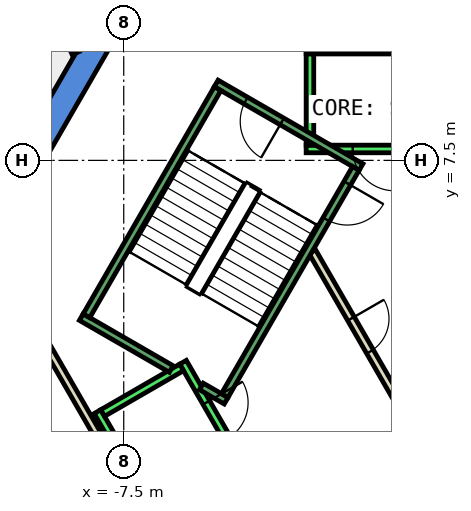
"""IFC4 building model, lengths in metres.
Left out: names, types, materials, properties, quantities, classifications, styles, units other than length and angle.
Written with IfcOpenShell. Run it as: python <this file> out.ifc"""

import sys

from ifc_helpers import new_model, si_unit, direction, frame, frame_2d, origin, place, context, subcontext, project, spatial, polyline, rectangle, outline, extrude, element, fill, save


model = new_model("IFC4")
c1 = context("Model", 3, precision=1e-05, world=origin(), true_north=direction((0.0, 1.0)))
c2 = subcontext(c1, "Body", "Model", "MODEL_VIEW")
j1 = project(units=[si_unit("LENGTHUNIT", "METRE"), si_unit("PLANEANGLEUNIT", "RADIAN")], contexts=[c1])
p1 = place(None, origin())
s1 = spatial("IfcSite", under=j1, at=p1, CompositionType="ELEMENT")
p2 = place(p1, origin())
s2 = spatial("IfcBuilding", under=s1, at=p2, CompositionType="ELEMENT")
p3 = place(p2, frame((0.0, 0.0, 219.2)))
s3 = spatial("IfcBuildingStorey", under=s2, at=p3, CompositionType="ELEMENT", Elevation=219.2)
p4 = place(p3, frame((0.0, 0.0, -0.4)))
e1 = element("IfcWall", 1, at=p4, inside=s3, PredefinedType="SHEAR", context=c2, shape_type="SweptSolid", body=[
    extrude(outline(polyline([(-11.834, 5.002), (-11.228, 4.652), (-6.235, 13.3), (-6.64, 14.0), (-11.834, 5.002)])), origin(), (0.0, 0.0, 1.0), 4.2),
])
p5 = place(p3, frame((0.0, 0.0, -0.4)))
e2 = element("IfcWall", 2, at=p5, inside=s3, PredefinedType="SHEAR", context=c2, shape_type="SweptSolid", body=[
    extrude(outline(polyline([(-13.279, 2.5), (-6.64, -9.0), (-6.235, -8.3), (-12.471, 2.5), (-13.279, 2.5)])), origin(), (0.0, 0.0, 1.0), 4.2),
])
p6 = place(p3, frame((-9.624, 12.265, 0.0), z_axis=(0.0, 0.0, 1.0), x_axis=(0.404081180606, -0.914723127225, 0.0)))
e3 = element("IfcWall", 3, at=p6, inside=s3, PredefinedType="PARTITIONING", context=c2, shape_type="SweptSolid", body=[
    extrude(rectangle(XDim=2.126, YDim=0.2, at=frame_2d((1.063, 0.0))), origin(), (0.0, 0.0, 1.0), 3.8),
])
p7 = place(p3, frame((-9.751, 2.99, 0.0), z_axis=(0.0, 0.0, 1.0), x_axis=(0.499955951776, -0.866050833545, 0.0)))
e4 = element("IfcWall", 4, at=p7, inside=s3, PredefinedType="PARTITIONING", context=c2, shape_type="SweptSolid", body=[
    extrude(rectangle(XDim=5.4, YDim=0.2, at=frame_2d((2.7, 0.0))), origin(), (0.0, 0.0, 1.0), 3.8),
])
p8 = place(p3, frame((-0.982, -1.0, 0.0), z_axis=(0.0, 0.0, 1.0), x_axis=(0.50024047865, 0.865886518847, 0.0)))
e5 = element("IfcWall", 5, at=p8, inside=s3, PredefinedType="PARTITIONING", context=c2, shape_type="SweptSolid", body=[
    extrude(rectangle(XDim=1.863, YDim=0.2, at=frame_2d((0.931, 0.0))), origin(), (0.0, 0.0, 1.0), 3.8),
])
p9 = place(p3, frame((-2.54, 5.1, 0.0), z_axis=(0.0, 0.0, 1.0), x_axis=(0.499925051871, -0.866068670783, 0.0)))
e6 = element("IfcWall", 6, at=p9, inside=s3, PredefinedType="PARTITIONING", context=c2, shape_type="SweptSolid", body=[
    extrude(rectangle(XDim=5.181, YDim=0.2, at=frame_2d((2.59, 0.0))), origin(), (0.0, 0.0, 1.0), 3.8),
])
p10 = place(p9, frame((2.04, 0.0, 0.0)))
e7 = element("IfcOpeningElement", 7, at=p10, cuts=e6, PredefinedType="OPENING", context=c2, shape_type="SweptSolid", body=[
    extrude(rectangle(XDim=1.0, YDim=2.1, at=frame_2d((0.5, 1.05))), frame((0.0, 0.11, 0.0), z_axis=(0.0, -1.0, 0.0), x_axis=(1.0, 0.0, 0.0)), (0.0, 0.0, 1.0), 0.22),
])
p11 = place(p3, frame((2.7, 7.8, 0.0), z_axis=(0.0, 0.0, 1.0), x_axis=(-1.0, 0.0, 0.0)))
e8 = element("IfcWall", 8, at=p11, inside=s3, PredefinedType="STANDARD", context=c2, shape_type="SweptSolid", body=[
    extrude(rectangle(XDim=5.4, YDim=0.2, at=frame_2d((2.7, 0.0))), origin(), (0.0, 0.0, 1.0), 3.8),
])
p12 = place(p11, frame((1.225, 0.0, 0.0)))
e9 = element("IfcOpeningElement", 9, at=p12, cuts=e8, PredefinedType="OPENING", context=c2, shape_type="SweptSolid", body=[
    extrude(rectangle(XDim=1.1, YDim=2.1, at=frame_2d((0.55, 1.05))), frame((0.0, 0.11, 0.0), z_axis=(0.0, -1.0, 0.0), x_axis=(1.0, 0.0, 0.0)), (0.0, 0.0, 1.0), 0.22),
])
p13 = place(p11, frame((3.075, 0.0, 0.0)))
e10 = element("IfcOpeningElement", 10, at=p13, cuts=e8, PredefinedType="OPENING", context=c2, shape_type="SweptSolid", body=[
    extrude(rectangle(XDim=1.1, YDim=2.1, at=frame_2d((0.55, 1.05))), frame((0.0, 0.11, 0.0), z_axis=(0.0, -1.0, 0.0), x_axis=(1.0, 0.0, 0.0)), (0.0, 0.0, 1.0), 0.22),
])
p14 = place(p3, frame((2.7, 10.4, 0.0), z_axis=(0.0, 0.0, 1.0), x_axis=(-1.0, 0.0, 0.0)))
e11 = element("IfcWall", 11, at=p14, inside=s3, PredefinedType="STANDARD", context=c2, shape_type="SweptSolid", body=[
    extrude(rectangle(XDim=5.4, YDim=0.2, at=frame_2d((2.7, 0.0))), origin(), (0.0, 0.0, 1.0), 3.8),
])
p15 = place(p3, frame((-2.6, 7.9, 0.0), z_axis=(0.0, 0.0, 1.0), x_axis=(0.0, 1.0, 0.0)))
e12 = element("IfcWall", 12, at=p15, inside=s3, PredefinedType="STANDARD", context=c2, shape_type="SweptSolid", body=[
    extrude(rectangle(XDim=2.4, YDim=0.2, at=frame_2d((1.2, 0.0))), origin(), (0.0, 0.0, 1.0), 3.8),
])
p16 = place(p3, frame((-5.94, 2.188, 0.0), z_axis=(0.0, 0.0, 1.0), x_axis=(0.500034260056, -0.866005622828, 0.0)))
e13 = element("IfcWall", 13, at=p16, inside=s3, PredefinedType="STANDARD", context=c2, shape_type="SweptSolid", body=[
    extrude(rectangle(XDim=5.399, YDim=0.2, at=frame_2d((2.7, 0.0))), origin(), (0.0, 0.0, 1.0), 3.8),
])
p17 = place(p16, frame((3.075, 0.0, 0.0)))
e14 = element("IfcOpeningElement", 14, at=p17, cuts=e13, PredefinedType="OPENING", context=c2, shape_type="SweptSolid", body=[
    extrude(rectangle(XDim=1.1, YDim=2.1, at=frame_2d((0.55, 1.05))), frame((0.0, 0.11, 0.0), z_axis=(0.0, -1.0, 0.0), x_axis=(1.0, 0.0, 0.0)), (0.0, 0.0, 1.0), 0.22),
])
p18 = place(p16, frame((1.225, 0.0, 0.0)))
e15 = element("IfcOpeningElement", 15, at=p18, cuts=e13, PredefinedType="OPENING", context=c2, shape_type="SweptSolid", body=[
    extrude(rectangle(XDim=1.1, YDim=2.1, at=frame_2d((0.55, 1.05))), frame((0.0, 0.11, 0.0), z_axis=(0.0, -1.0, 0.0), x_axis=(1.0, 0.0, 0.0)), (0.0, 0.0, 1.0), 0.22),
])
p19 = place(p3, frame((-8.192, 0.888, 0.0), z_axis=(0.0, 0.0, 1.0), x_axis=(0.500034260056, -0.866005622828, 0.0)))
e16 = element("IfcWall", 16, at=p19, inside=s3, PredefinedType="STANDARD", context=c2, shape_type="SweptSolid", body=[
    extrude(rectangle(XDim=5.399, YDim=0.2, at=frame_2d((2.7, 0.0))), origin(), (0.0, 0.0, 1.0), 3.8),
])
p20 = place(p3, frame((-5.977, 2.052, 0.0), z_axis=(0.0, 0.0, 1.0), x_axis=(-0.865973769406, -0.500089422704, 0.0)))
e17 = element("IfcWall", 17, at=p20, inside=s3, PredefinedType="STANDARD", context=c2, shape_type="SweptSolid", body=[
    extrude(rectangle(XDim=2.399, YDim=0.2, at=frame_2d((1.2, 0.0))), origin(), (0.0, 0.0, 1.0), 3.8),
])
p21 = place(p3, frame((-1.256, 7.324, 0.0), z_axis=(0.0, 0.0, 1.0), x_axis=(-0.866046073146, 0.499964197906, 0.0)))
e18 = element("IfcWall", 18, at=p21, inside=s3, PredefinedType="STANDARD", context=c2, shape_type="SweptSolid", body=[
    extrude(rectangle(XDim=4.4, YDim=0.2, at=frame_2d((2.2, 0.0))), origin(), (0.0, 0.0, 1.0), 3.8),
])
p22 = place(p21, frame((2.4, 0.0, 0.0)))
e19 = element("IfcOpeningElement", 19, at=p22, cuts=e18, PredefinedType="OPENING", context=c2, shape_type="SweptSolid", body=[
    extrude(rectangle(XDim=1.1, YDim=2.2, at=frame_2d((0.55, 1.1))), frame((0.0, 0.11, 0.0), z_axis=(0.0, -1.0, 0.0), x_axis=(1.0, 0.0, 0.0)), (0.0, 0.0, 1.0), 0.22),
])
p23 = place(p3, frame((-6.25, 2.01, 0.0), z_axis=(0.0, 0.0, 1.0), x_axis=(-0.86611865017, 0.499838457731, 0.0)))
e20 = element("IfcWall", 20, at=p23, inside=s3, PredefinedType="STANDARD", context=c2, shape_type="SweptSolid", body=[
    extrude(rectangle(XDim=2.733, YDim=0.2, at=frame_2d((1.366, 0.0))), origin(), (0.0, 0.0, 1.0), 3.8),
])
p24 = place(p3, frame((-4.806, 1.176, 0.0), z_axis=(0.0, 0.0, 1.0), x_axis=(-0.866558586415, 0.499075361355, 0.0)))
e21 = element("IfcWall", 21, at=p24, inside=s3, PredefinedType="STANDARD", context=c2, shape_type="SweptSolid", body=[
    extrude(rectangle(XDim=0.751, YDim=0.2, at=frame_2d((0.376, 0.0))), origin(), (0.0, 0.0, 1.0), 3.8),
])
p25 = place(p3, frame((-1.393, 7.288, 0.0), z_axis=(0.0, 0.0, 1.0), x_axis=(-0.499963383562, -0.866046543262, 0.0)))
e22 = element("IfcWall", 22, at=p25, inside=s3, PredefinedType="STANDARD", context=c2, shape_type="SweptSolid", body=[
    extrude(rectangle(XDim=6.9, YDim=0.2, at=frame_2d((3.45, 0.0))), origin(), (0.0, 0.0, 1.0), 3.8),
])
p26 = place(p25, frame((0.45, 0.0, 0.0)))
e23 = element("IfcOpeningElement", 23, at=p26, cuts=e22, PredefinedType="OPENING", context=c2, shape_type="SweptSolid", body=[
    extrude(rectangle(XDim=1.1, YDim=2.2, at=frame_2d((0.55, 1.1))), frame((0.0, 0.11, 0.0), z_axis=(0.0, -1.0, 0.0), x_axis=(1.0, 0.0, 0.0)), (0.0, 0.0, 1.0), 0.22),
])
p27 = place(p3, frame((-5.03, 9.388, 0.0), z_axis=(0.0, 0.0, 1.0), x_axis=(-0.499978703459, -0.866037698999, 0.0)))
e24 = element("IfcWall", 24, at=p27, inside=s3, PredefinedType="STANDARD", context=c2, shape_type="SweptSolid", body=[
    extrude(rectangle(XDim=6.9, YDim=0.2, at=frame_2d((3.45, 0.0))), origin(), (0.0, 0.0, 1.0), 3.8),
])
p28 = place(p10, origin())
e25 = element("IfcDoor", 25, at=p28, inside=s3, OperationType="SINGLE_SWING_RIGHT", PredefinedType="DOOR", context=c2, shape_type="SweptSolid", body=[
    extrude(rectangle(XDim=1.0, YDim=2.1, at=frame_2d((0.5, 1.05))), frame((0.0, 0.025, 0.0), z_axis=(0.0, -1.0, 0.0), x_axis=(1.0, 0.0, 0.0)), (0.0, 0.0, 1.0), 0.05),
])
fill(e7, e25)
p29 = place(p13, origin())
e26 = element("IfcDoor", 26, at=p29, inside=s3, OperationType="SLIDING_TO_LEFT", PredefinedType="DOOR", context=c2, shape_type="SweptSolid", body=[
    extrude(rectangle(XDim=1.1, YDim=2.1, at=frame_2d((0.55, 1.05))), frame((0.0, 0.025, 0.0), z_axis=(0.0, -1.0, 0.0), x_axis=(1.0, 0.0, 0.0)), (0.0, 0.0, 1.0), 0.05),
])
fill(e10, e26)
p30 = place(p18, origin())
e27 = element("IfcDoor", 27, at=p30, inside=s3, OperationType="SLIDING_TO_LEFT", PredefinedType="DOOR", context=c2, shape_type="SweptSolid", body=[
    extrude(rectangle(XDim=1.1, YDim=2.1, at=frame_2d((0.55, 1.05))), frame((0.0, 0.025, 0.0), z_axis=(0.0, -1.0, 0.0), x_axis=(1.0, 0.0, 0.0)), (0.0, 0.0, 1.0), 0.05),
])
fill(e15, e27)
p31 = place(p26, origin())
e28 = element("IfcDoor", 28, at=p31, inside=s3, OperationType="SINGLE_SWING_LEFT", PredefinedType="DOOR", context=c2, shape_type="SweptSolid", body=[
    extrude(rectangle(XDim=1.1, YDim=2.2, at=frame_2d((0.55, 1.1))), frame((0.0, 0.025, 0.0), z_axis=(0.0, -1.0, 0.0), x_axis=(1.0, 0.0, 0.0)), (0.0, 0.0, 1.0), 0.05),
])
fill(e23, e28)
p32 = place(p22, origin())
e29 = element("IfcDoor", 29, at=p32, inside=s3, OperationType="SINGLE_SWING_LEFT", PredefinedType="DOOR", context=c2, shape_type="SweptSolid", body=[
    extrude(rectangle(XDim=1.1, YDim=2.2, at=frame_2d((0.55, 1.1))), frame((0.0, 0.025, 0.0), z_axis=(0.0, -1.0, 0.0), x_axis=(1.0, 0.0, 0.0)), (0.0, 0.0, 1.0), 0.05),
])
fill(e19, e29)
save(model, sys.argv[1])
